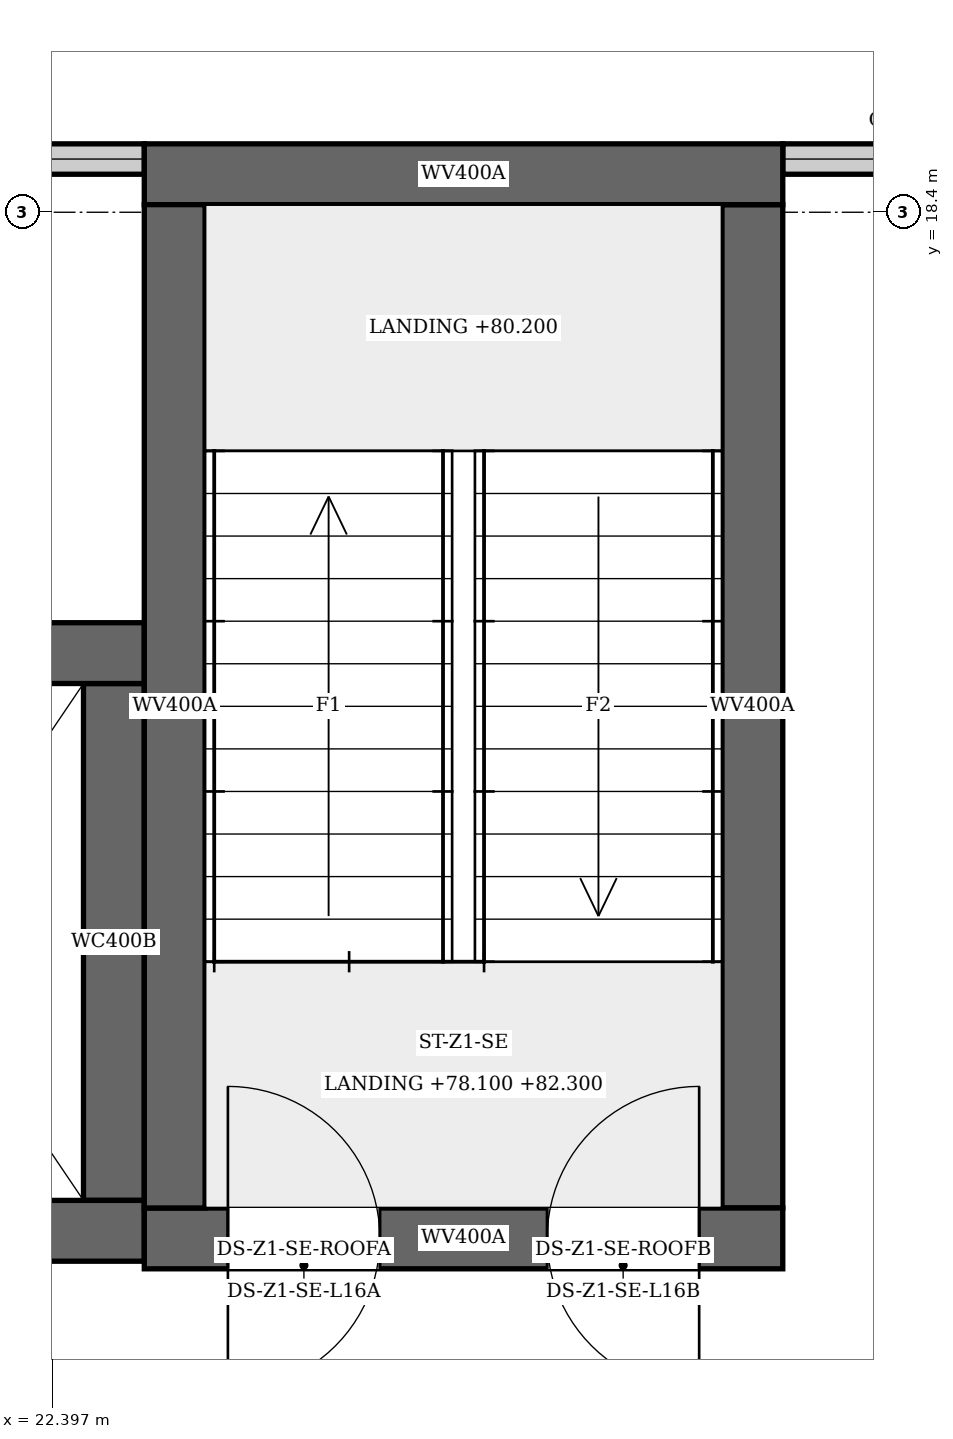
"""IFC4 building model, lengths in metres.
Left out: names, types, materials, properties, quantities, classifications, styles, units other than length and angle.
Written with IfcOpenShell. Run it as: python <this file> out.ifc"""

import sys

from ifc_helpers import new_model, si_unit, direction, frame, frame_2d, origin, place, context, subcontext, project, spatial, rectangle, extrude, element, fill, save


model = new_model("IFC4")
c1 = context("Model", 3, precision=1e-05, world=origin(), true_north=direction((0.0, 1.0)))
c2 = subcontext(c1, "Body", "Model", "MODEL_VIEW")
j1 = project(units=[si_unit("LENGTHUNIT", "METRE"), si_unit("PLANEANGLEUNIT", "RADIAN")], contexts=[c1])
p1 = place(None, origin())
s1 = spatial("IfcSite", under=j1, at=p1, CompositionType="ELEMENT")
p2 = place(p1, origin())
s2 = spatial("IfcBuilding", under=s1, at=p2, CompositionType="ELEMENT")
p3 = place(p2, frame((0.0, 0.0, 78.1)))
s3 = spatial("IfcBuildingStorey", under=s2, at=p3, CompositionType="ELEMENT", Elevation=78.1)
p4 = place(p3, frame((23.0, 11.65, 0.0), z_axis=(0.0, 0.0, 1.0), x_axis=(1.0, 0.0, 0.0)))
e1 = element("IfcWall", 1, at=p4, inside=s3, PredefinedType="SHEAR", context=c2, shape_type="SweptSolid", body=[
    extrude(rectangle(XDim=4.2, YDim=0.4, at=frame_2d((2.1, 0.0))), origin(), (0.0, 0.0, 1.0), 7.1),
])
p5 = place(p4, frame((0.55, 0.0, 0.0)))
e2 = element("IfcOpeningElement", 2, at=p5, cuts=e1, PredefinedType="OPENING", context=c2, shape_type="SweptSolid", body=[
    extrude(rectangle(XDim=1.0, YDim=2.1, at=frame_2d((0.5, 1.05))), frame((0.0, 0.21, 0.0), z_axis=(0.0, -1.0, 0.0), x_axis=(1.0, 0.0, 0.0)), (0.0, 0.0, 1.0), 0.42),
])
p6 = place(p4, frame((2.65, 0.0, 0.0)))
e3 = element("IfcOpeningElement", 3, at=p6, cuts=e1, PredefinedType="OPENING", context=c2, shape_type="SweptSolid", body=[
    extrude(rectangle(XDim=1.0, YDim=2.1, at=frame_2d((0.5, 1.05))), frame((0.0, 0.21, 0.0), z_axis=(0.0, -1.0, 0.0), x_axis=(1.0, 0.0, 0.0)), (0.0, 0.0, 1.0), 0.42),
])
p7 = place(p4, frame((0.55, 0.0, 4.2)))
e4 = element("IfcOpeningElement", 4, at=p7, cuts=e1, PredefinedType="OPENING", context=c2, shape_type="SweptSolid", body=[
    extrude(rectangle(XDim=1.0, YDim=2.1, at=frame_2d((0.5, 1.05))), frame((0.0, 0.21, 0.0), z_axis=(0.0, -1.0, 0.0), x_axis=(1.0, 0.0, 0.0)), (0.0, 0.0, 1.0), 0.42),
])
p8 = place(p4, frame((2.65, 0.0, 4.2)))
e5 = element("IfcOpeningElement", 5, at=p8, cuts=e1, PredefinedType="OPENING", context=c2, shape_type="SweptSolid", body=[
    extrude(rectangle(XDim=1.0, YDim=2.1, at=frame_2d((0.5, 1.05))), frame((0.0, 0.21, 0.0), z_axis=(0.0, -1.0, 0.0), x_axis=(1.0, 0.0, 0.0)), (0.0, 0.0, 1.0), 0.42),
])
p9 = place(p3, frame((23.0, 18.65, 0.0), z_axis=(0.0, 0.0, 1.0), x_axis=(1.0, 0.0, 0.0)))
e6 = element("IfcWall", 6, at=p9, inside=s3, PredefinedType="SHEAR", context=c2, shape_type="SweptSolid", body=[
    extrude(rectangle(XDim=4.2, YDim=0.4, at=frame_2d((2.1, 0.0))), origin(), (0.0, 0.0, 1.0), 7.1),
])
for number, where, z_axis, x_axis in (
    (7, (23.2, 11.85, 0.0), (0.0, 0.0, 1.0), (0.0, 1.0, 0.0)),
    (8, (27.0, 11.85, 0.0), (0.0, 0.0, 1.0), (0.0, 1.0, 0.0)),
):
    element("IfcWall", number, at=place(p3, frame(where, z_axis=z_axis, x_axis=x_axis)), inside=s3, PredefinedType="SHEAR", context=c2, shape_type="SweptSolid", body=[
        extrude(rectangle(XDim=6.6, YDim=0.4, at=frame_2d((3.3, 0.0))), origin(), (0.0, 0.0, 1.0), 7.1),
    ])
p10 = place(p3, frame((19.9, 11.7, 0.0), z_axis=(0.0, 0.0, 1.0), x_axis=(1.0, 0.0, 0.0)))
e9 = element("IfcWall", 9, at=p10, inside=s3, PredefinedType="SHEAR", context=c2, shape_type="SweptSolid", body=[
    extrude(rectangle(XDim=3.1, YDim=0.4, at=frame_2d((1.55, 0.0))), origin(), (0.0, 0.0, 1.0), 7.6),
])
p11 = place(p3, frame((19.9, 15.5, 0.0), z_axis=(0.0, 0.0, 1.0), x_axis=(1.0, 0.0, 0.0)))
e10 = element("IfcWall", 10, at=p11, inside=s3, PredefinedType="SHEAR", context=c2, shape_type="SweptSolid", body=[
    extrude(rectangle(XDim=3.1, YDim=0.4, at=frame_2d((1.55, 0.0))), origin(), (0.0, 0.0, 1.0), 7.6),
])
p12 = place(p11, frame((0.95, 0.0, 0.0)))
e11 = element("IfcOpeningElement", 11, at=p12, cuts=e10, PredefinedType="OPENING", context=c2, shape_type="SweptSolid", body=[
    extrude(rectangle(XDim=1.2, YDim=2.1, at=frame_2d((0.6, 1.05))), frame((0.0, 0.21, 0.0), z_axis=(0.0, -1.0, 0.0), x_axis=(1.0, 0.0, 0.0)), (0.0, 0.0, 1.0), 0.42),
])
p13 = place(p3, frame((22.8, 11.9, 0.0), z_axis=(0.0, 0.0, 1.0), x_axis=(0.0, 1.0, 0.0)))
e12 = element("IfcWall", 12, at=p13, inside=s3, PredefinedType="SHEAR", context=c2, shape_type="SweptSolid", body=[
    extrude(rectangle(XDim=3.4, YDim=0.4, at=frame_2d((1.7, 0.0))), origin(), (0.0, 0.0, 1.0), 7.6),
])
p14 = place(p3, frame((23.0, 18.75, 4.2), z_axis=(0.0, 0.0, 1.0), x_axis=(-1.0, 0.0, 0.0)))
e13 = element("IfcWall", 13, at=p14, inside=s3, PredefinedType="PARAPET", context=c2, shape_type="SweptSolid", body=[
    extrude(rectangle(XDim=23.2, YDim=0.2, at=frame_2d((11.6, 0.0))), origin(), (0.0, 0.0, 1.0), 1.1),
])
p15 = place(p3, frame((28.8, 18.75, 4.2), z_axis=(0.0, 0.0, 1.0), x_axis=(-1.0, 0.0, 0.0)))
e14 = element("IfcWall", 14, at=p15, inside=s3, PredefinedType="PARAPET", context=c2, shape_type="SweptSolid", body=[
    extrude(rectangle(XDim=1.6, YDim=0.2, at=frame_2d((0.8, 0.0))), origin(), (0.0, 0.0, 1.0), 1.1),
])
p16 = place(p5, origin())
e15 = element("IfcDoor", 15, at=p16, inside=s3, OperationType="SINGLE_SWING_RIGHT", PredefinedType="DOOR", context=c2, shape_type="SweptSolid", body=[
    extrude(rectangle(XDim=1.0, YDim=2.1, at=frame_2d((0.5, 1.05))), frame((0.0, 0.025, 0.0), z_axis=(0.0, -1.0, 0.0), x_axis=(1.0, 0.0, 0.0)), (0.0, 0.0, 1.0), 0.05),
])
fill(e2, e15)
p17 = place(p6, origin())
e16 = element("IfcDoor", 16, at=p17, inside=s3, OperationType="SINGLE_SWING_LEFT", PredefinedType="DOOR", context=c2, shape_type="SweptSolid", body=[
    extrude(rectangle(XDim=1.0, YDim=2.1, at=frame_2d((0.5, 1.05))), frame((0.0, 0.025, 0.0), z_axis=(0.0, -1.0, 0.0), x_axis=(1.0, 0.0, 0.0)), (0.0, 0.0, 1.0), 0.05),
])
fill(e3, e16)
p18 = place(p7, frame((1.0, 0.0, 0.0), z_axis=(0.0, 0.0, 1.0), x_axis=(-1.0, 0.0, 0.0)))
e17 = element("IfcDoor", 17, at=p18, inside=s3, OperationType="SINGLE_SWING_LEFT", PredefinedType="DOOR", context=c2, shape_type="SweptSolid", body=[
    extrude(rectangle(XDim=1.0, YDim=2.1, at=frame_2d((0.5, 1.05))), frame((0.0, 0.025, 0.0), z_axis=(0.0, -1.0, 0.0), x_axis=(1.0, 0.0, 0.0)), (0.0, 0.0, 1.0), 0.05),
])
fill(e4, e17)
p19 = place(p8, frame((1.0, 0.0, 0.0), z_axis=(0.0, 0.0, 1.0), x_axis=(-1.0, 0.0, 0.0)))
e18 = element("IfcDoor", 18, at=p19, inside=s3, OperationType="SINGLE_SWING_RIGHT", PredefinedType="DOOR", context=c2, shape_type="SweptSolid", body=[
    extrude(rectangle(XDim=1.0, YDim=2.1, at=frame_2d((0.5, 1.05))), frame((0.0, 0.025, 0.0), z_axis=(0.0, -1.0, 0.0), x_axis=(1.0, 0.0, 0.0)), (0.0, 0.0, 1.0), 0.05),
])
fill(e5, e18)
save(model, sys.argv[1])
